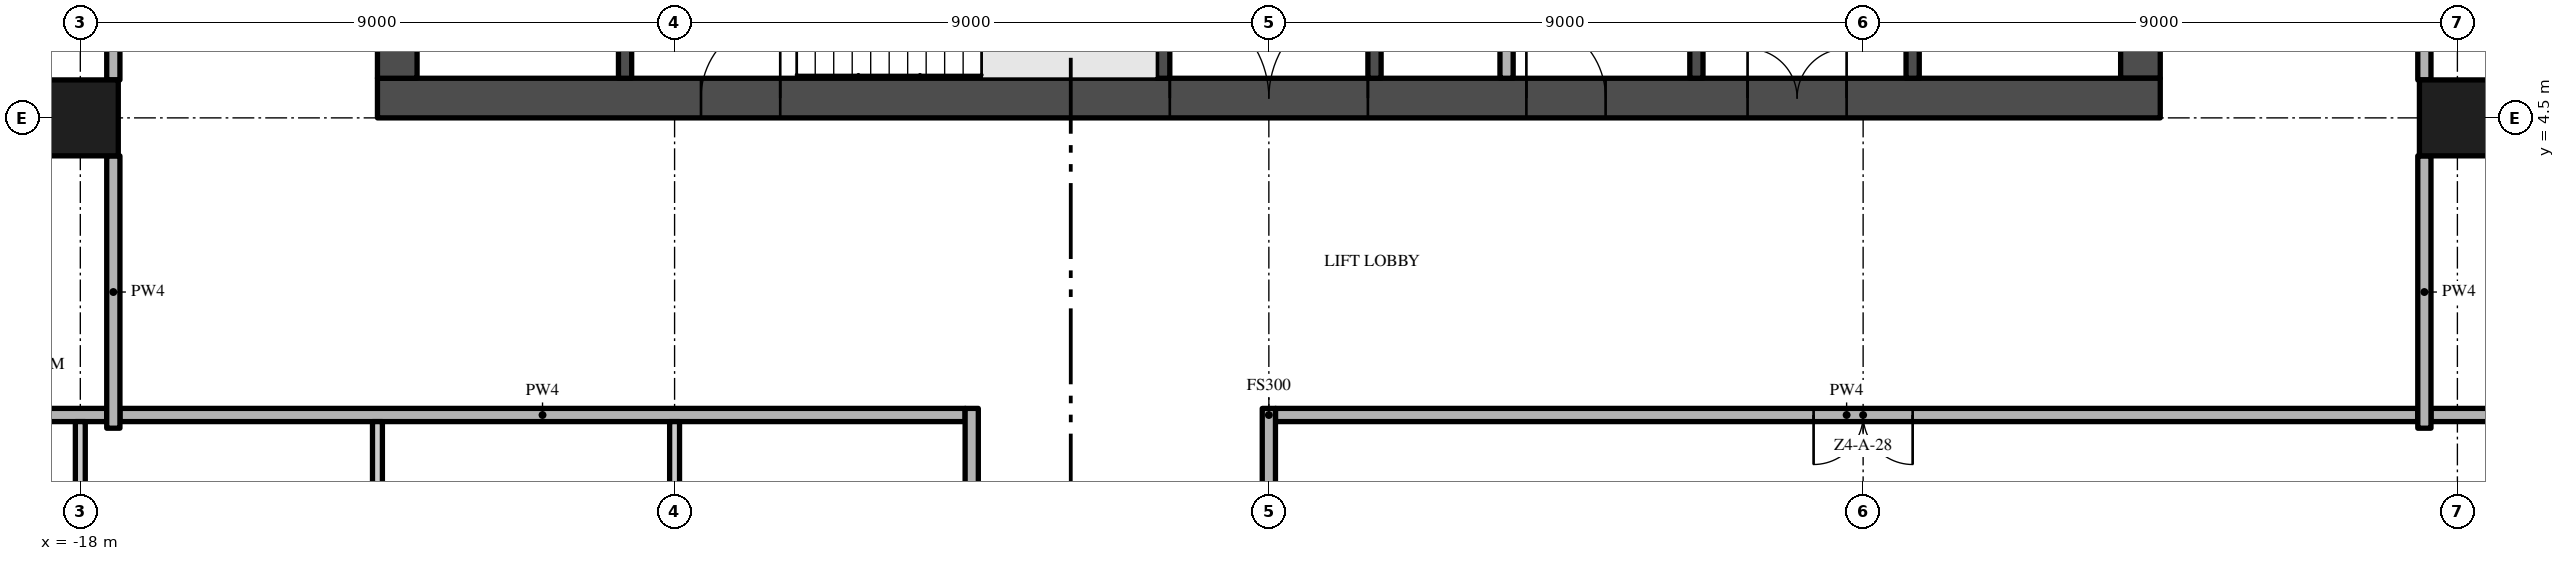
"""IFC4 building model, lengths in metres.
Left out: names, types, materials, properties, quantities, classifications, styles, units other than length and angle.
Written with IfcOpenShell. Run it as: python <this file> out.ifc"""

import sys

from ifc_helpers import new_model, si_unit, direction, frame, frame_2d, origin, origin_2d, place, context, subcontext, project, spatial, rectangle, extrude, element, fill, save


model = new_model("IFC4")
c1 = context("Model", 3, precision=1e-05, world=origin(), true_north=direction((0.0, 1.0)))
c2 = subcontext(c1, "Body", "Model", "MODEL_VIEW")
j1 = project(units=[si_unit("LENGTHUNIT", "METRE"), si_unit("PLANEANGLEUNIT", "RADIAN")], contexts=[c1])
p1 = place(None, origin())
s1 = spatial("IfcSite", under=j1, at=p1, CompositionType="ELEMENT")
p2 = place(p1, origin())
s2 = spatial("IfcBuilding", under=s1, at=p2, CompositionType="ELEMENT")
p3 = place(p2, frame((0.0, 0.0, 184.4)))
s3 = spatial("IfcBuildingStorey", under=s2, at=p3, CompositionType="ELEMENT", Elevation=184.4)
p4 = place(p3, frame((-13.5, 4.8, -0.3), z_axis=(0.0, 0.0, 1.0), x_axis=(1.0, 0.0, 0.0)))
e1 = element("IfcWall", 1, at=p4, inside=s3, PredefinedType="SHEAR", context=c2, shape_type="SweptSolid", body=[
    extrude(rectangle(XDim=27.0, YDim=0.6, at=frame_2d((13.5, 0.0))), origin(), (0.0, 0.0, 1.0), 3.8),
])
p5 = place(p4, frame((12.0, 0.0, 0.3)))
e2 = element("IfcOpeningElement", 2, at=p5, cuts=e1, PredefinedType="OPENING", context=c2, shape_type="SweptSolid", body=[
    extrude(rectangle(XDim=3.0, YDim=2.4, at=frame_2d((1.5, 1.2))), frame((0.0, 0.31, 0.0), z_axis=(0.0, -1.0, 0.0), x_axis=(1.0, 0.0, 0.0)), (0.0, 0.0, 1.0), 0.62),
])
p6 = place(p4, frame((4.9, 0.0, 0.3)))
e3 = element("IfcOpeningElement", 3, at=p6, cuts=e1, PredefinedType="OPENING", context=c2, shape_type="SweptSolid", body=[
    extrude(rectangle(XDim=1.2, YDim=2.2, at=frame_2d((0.6, 1.1))), frame((0.0, 0.31, 0.0), z_axis=(0.0, -1.0, 0.0), x_axis=(1.0, 0.0, 0.0)), (0.0, 0.0, 1.0), 0.62),
])
p7 = place(p4, frame((20.75, 0.0, 0.3)))
e4 = element("IfcOpeningElement", 4, at=p7, cuts=e1, PredefinedType="OPENING", context=c2, shape_type="SweptSolid", body=[
    extrude(rectangle(XDim=1.5, YDim=2.2, at=frame_2d((0.75, 1.1))), frame((0.0, 0.31, 0.0), z_axis=(0.0, -1.0, 0.0), x_axis=(1.0, 0.0, 0.0)), (0.0, 0.0, 1.0), 0.62),
])
p8 = place(p4, frame((17.4, 0.0, 0.3)))
e5 = element("IfcOpeningElement", 5, at=p8, cuts=e1, PredefinedType="OPENING", context=c2, shape_type="SweptSolid", body=[
    extrude(rectangle(XDim=1.2, YDim=2.2, at=frame_2d((0.6, 1.1))), frame((0.0, 0.31, 0.0), z_axis=(0.0, -1.0, 0.0), x_axis=(1.0, 0.0, 0.0)), (0.0, 0.0, 1.0), 0.62),
])
p9 = place(p3, frame((13.2, 5.1, -0.3), z_axis=(0.0, 0.0, 1.0), x_axis=(0.0, 1.0, 0.0)))
e6 = element("IfcWall", 6, at=p9, inside=s3, PredefinedType="SHEAR", context=c2, shape_type="SweptSolid", body=[
    extrude(rectangle(XDim=16.8, YDim=0.6, at=frame_2d((8.4, 0.0))), origin(), (0.0, 0.0, 1.0), 3.8),
])
p10 = place(p9, frame((6.3, 0.0, 0.3)))
e7 = element("IfcOpeningElement", 7, at=p10, cuts=e6, PredefinedType="OPENING", context=c2, shape_type="SweptSolid", body=[
    extrude(rectangle(XDim=1.2, YDim=2.2, at=frame_2d((0.6, 1.1))), frame((0.0, 0.31, 0.0), z_axis=(0.0, -1.0, 0.0), x_axis=(1.0, 0.0, 0.0)), (0.0, 0.0, 1.0), 0.62),
])
p11 = place(p3, frame((-13.2, 21.9, -0.3), z_axis=(0.0, 0.0, 1.0), x_axis=(0.0, -1.0, 0.0)))
e8 = element("IfcWall", 8, at=p11, inside=s3, PredefinedType="SHEAR", context=c2, shape_type="SweptSolid", body=[
    extrude(rectangle(XDim=16.8, YDim=0.6, at=frame_2d((8.4, 0.0))), origin(), (0.0, 0.0, 1.0), 3.8),
])
p12 = place(p11, frame((9.3, 0.0, 0.3)))
e9 = element("IfcOpeningElement", 9, at=p12, cuts=e8, PredefinedType="OPENING", context=c2, shape_type="SweptSolid", body=[
    extrude(rectangle(XDim=1.2, YDim=2.2, at=frame_2d((0.6, 1.1))), frame((0.0, 0.31, 0.0), z_axis=(0.0, -1.0, 0.0), x_axis=(1.0, 0.0, 0.0)), (0.0, 0.0, 1.0), 0.62),
])
for number, where, z_axis, x_axis in (
    (10, (-18.0, 4.5, 0.0), (0.0, 0.0, 1.0), (1.0, 0.0, 0.0)),
    (11, (18.0, 4.5, 0.0), (0.0, 0.0, 1.0), (1.0, 0.0, 0.0)),
):
    element("IfcColumn", number, at=place(p3, frame(where, z_axis=z_axis, x_axis=x_axis)), inside=s3, PredefinedType="COLUMN", context=c2, shape_type="SweptSolid", body=[
        extrude(rectangle(XDim=1.15, YDim=1.15, at=origin_2d()), origin(), (0.0, 0.0, 1.0), 3.5),
    ])
for number, where, z_axis, x_axis in (
    (12, (-9.75, 5.1, 0.0), (0.0, 0.0, 1.0), (0.0, 1.0, 0.0)),
    (13, (-1.6, 5.1, 0.0), (0.0, 0.0, 1.0), (0.0, 1.0, 0.0)),
):
    element("IfcWall", number, at=place(p3, frame(where, z_axis=z_axis, x_axis=x_axis)), inside=s3, PredefinedType="SHEAR", context=c2, shape_type="SweptSolid", body=[
        extrude(rectangle(XDim=2.85, YDim=0.2, at=frame_2d((1.425, 0.0))), origin(), (0.0, 0.0, 1.0), 3.5),
    ])
p13 = place(p3, frame((1.6, 13.5, 0.0), z_axis=(0.0, 0.0, 1.0), x_axis=(0.0, -1.0, 0.0)))
e14 = element("IfcWall", 14, at=p13, inside=s3, PredefinedType="SHEAR", context=c2, shape_type="SweptSolid", body=[
    extrude(rectangle(XDim=8.4, YDim=0.2, at=frame_2d((4.2, 0.0))), origin(), (0.0, 0.0, 1.0), 3.5),
])
p14 = place(p13, frame((3.35, 0.0, 0.0)))
e15 = element("IfcOpeningElement", 15, at=p14, cuts=e14, PredefinedType="OPENING", context=c2, shape_type="SweptSolid", body=[
    extrude(rectangle(XDim=0.9, YDim=2.1, at=frame_2d((0.45, 1.05))), frame((0.0, 0.11, 0.0), z_axis=(0.0, -1.0, 0.0), x_axis=(1.0, 0.0, 0.0)), (0.0, 0.0, 1.0), 0.22),
])
p15 = place(p3, frame((3.6, 13.5, 0.0), z_axis=(0.0, 0.0, 1.0), x_axis=(0.0, -1.0, 0.0)))
e16 = element("IfcWall", 16, at=p15, inside=s3, PredefinedType="PARTITIONING", context=c2, shape_type="SweptSolid", body=[
    extrude(rectangle(XDim=8.4, YDim=0.2, at=frame_2d((4.2, 0.0))), origin(), (0.0, 0.0, 1.0), 3.5),
])
p16 = place(p15, frame((3.75, 0.0, 0.0)))
e17 = element("IfcOpeningElement", 17, at=p16, cuts=e16, PredefinedType="OPENING", context=c2, shape_type="SweptSolid", body=[
    extrude(rectangle(XDim=0.9, YDim=2.1, at=frame_2d((0.45, 1.05))), frame((0.0, 0.11, 0.0), z_axis=(0.0, -1.0, 0.0), x_axis=(1.0, 0.0, 0.0)), (0.0, 0.0, 1.0), 0.22),
])
p17 = place(p3, frame((6.475, 5.1, 0.0), z_axis=(0.0, 0.0, 1.0), x_axis=(0.0, 1.0, 0.0)))
e18 = element("IfcWall", 18, at=p17, inside=s3, PredefinedType="SHEAR", context=c2, shape_type="SweptSolid", body=[
    extrude(rectangle(XDim=7.0, YDim=0.2, at=frame_2d((3.5, 0.0))), origin(), (0.0, 0.0, 1.0), 3.5),
])
p18 = place(p3, frame((9.75, 5.1, 0.0), z_axis=(0.0, 0.0, 1.0), x_axis=(0.0, 1.0, 0.0)))
e19 = element("IfcWall", 19, at=p18, inside=s3, PredefinedType="SHEAR", context=c2, shape_type="SweptSolid", body=[
    extrude(rectangle(XDim=2.5, YDim=0.2, at=frame_2d((1.25, 0.0))), origin(), (0.0, 0.0, 1.0), 3.5),
])
p19 = place(p18, frame((0.85, 0.0, 0.0)))
e20 = element("IfcOpeningElement", 20, at=p19, cuts=e19, PredefinedType="OPENING", context=c2, shape_type="SweptSolid", body=[
    extrude(rectangle(XDim=1.1, YDim=2.1, at=frame_2d((0.55, 1.05))), frame((0.0, 0.11, 0.0), z_axis=(0.0, -1.0, 0.0), x_axis=(1.0, 0.0, 0.0)), (0.0, 0.0, 1.0), 0.22),
])
p20 = place(p3, frame((-17.4, 0.0, 0.0), z_axis=(0.0, 0.0, 1.0), x_axis=(1.0, 0.0, 0.0)))
e21 = element("IfcWall", 21, at=p20, inside=s3, PredefinedType="PARTITIONING", context=c2, shape_type="SweptSolid", body=[
    extrude(rectangle(XDim=12.8, YDim=0.2, at=frame_2d((6.4, 0.0))), origin(), (0.0, 0.0, 1.0), 3.5),
])
p21 = place(p3, frame((17.4, 0.0, 0.0), z_axis=(0.0, 0.0, 1.0), x_axis=(-1.0, 0.0, 0.0)))
e22 = element("IfcWall", 22, at=p21, inside=s3, PredefinedType="PARTITIONING", context=c2, shape_type="SweptSolid", body=[
    extrude(rectangle(XDim=17.3, YDim=0.2, at=frame_2d((8.65, 0.0))), origin(), (0.0, 0.0, 1.0), 3.5),
])
p22 = place(p21, frame((7.65, 0.0, 0.0)))
e23 = element("IfcOpeningElement", 23, at=p22, cuts=e22, PredefinedType="OPENING", context=c2, shape_type="SweptSolid", body=[
    extrude(rectangle(XDim=1.5, YDim=2.4, at=frame_2d((0.75, 1.2))), frame((0.0, 0.11, 0.0), z_axis=(0.0, -1.0, 0.0), x_axis=(1.0, 0.0, 0.0)), (0.0, 0.0, 1.0), 0.22),
])
for number, where, z_axis, x_axis in (
    (24, (-26.7, 0.0, 0.0), (0.0, 0.0, 1.0), (1.0, 0.0, 0.0)),
    (25, (17.6, 0.0, 0.0), (0.0, 0.0, 1.0), (1.0, 0.0, 0.0)),
):
    element("IfcWall", number, at=place(p3, frame(where, z_axis=z_axis, x_axis=x_axis)), inside=s3, PredefinedType="PARTITIONING", context=c2, shape_type="SweptSolid", body=[
        extrude(rectangle(XDim=9.1, YDim=0.2, at=frame_2d((4.55, 0.0))), origin(), (0.0, 0.0, 1.0), 3.5),
    ])
p23 = place(p3, frame((-18.0, -3.925, 0.0), z_axis=(0.0, 0.0, 1.0), x_axis=(0.0, 1.0, 0.0)))
e26 = element("IfcWall", 26, at=p23, inside=s3, PredefinedType="PARTITIONING", context=c2, shape_type="SweptSolid", body=[
    extrude(rectangle(XDim=3.825, YDim=0.15, at=frame_2d((1.913, 0.0))), origin(), (0.0, 0.0, 1.0), 3.5),
])
p24 = place(p23, frame((0.15, 0.0, 0.0)))
e27 = element("IfcOpeningElement", 27, at=p24, cuts=e26, PredefinedType="OPENING", context=c2, shape_type="SweptSolid", body=[
    extrude(rectangle(XDim=1.0, YDim=2.4, at=frame_2d((0.5, 1.2))), frame((0.0, 0.085, 0.0), z_axis=(0.0, -1.0, 0.0), x_axis=(1.0, 0.0, 0.0)), (0.0, 0.0, 1.0), 0.17),
])
p25 = place(p3, frame((-17.5, -0.2, 0.0), z_axis=(0.0, 0.0, 1.0), x_axis=(0.0, 1.0, 0.0)))
e28 = element("IfcWall", 28, at=p25, inside=s3, PredefinedType="PARTITIONING", context=c2, shape_type="SweptSolid", body=[
    extrude(rectangle(XDim=4.125, YDim=0.2, at=frame_2d((2.062, 0.0))), origin(), (0.0, 0.0, 1.0), 3.5),
])
p26 = place(p3, frame((-17.5, 5.075, 0.0), z_axis=(0.0, 0.0, 1.0), x_axis=(0.0, 1.0, 0.0)))
e29 = element("IfcWall", 29, at=p26, inside=s3, PredefinedType="PARTITIONING", context=c2, shape_type="SweptSolid", body=[
    extrude(rectangle(XDim=7.85, YDim=0.2, at=frame_2d((3.925, 0.0))), origin(), (0.0, 0.0, 1.0), 3.5),
])
p27 = place(p26, frame((1.05, 0.0, 0.0)))
e30 = element("IfcOpeningElement", 30, at=p27, cuts=e29, PredefinedType="OPENING", context=c2, shape_type="SweptSolid", body=[
    extrude(rectangle(XDim=1.2, YDim=2.4, at=frame_2d((0.6, 1.2))), frame((0.0, 0.11, 0.0), z_axis=(0.0, -1.0, 0.0), x_axis=(1.0, 0.0, 0.0)), (0.0, 0.0, 1.0), 0.22),
])
p28 = place(p3, frame((-13.5, -11.325, 0.0), z_axis=(0.0, 0.0, 1.0), x_axis=(0.0, 1.0, 0.0)))
e31 = element("IfcWall", 31, at=p28, inside=s3, PredefinedType="PARTITIONING", context=c2, shape_type="SweptSolid", body=[
    extrude(rectangle(XDim=11.225, YDim=0.15, at=frame_2d((5.612, 0.0))), origin(), (0.0, 0.0, 1.0), 3.5),
])
p29 = place(p3, frame((-9.0, -3.925, 0.0), z_axis=(0.0, 0.0, 1.0), x_axis=(0.0, 1.0, 0.0)))
e32 = element("IfcWall", 32, at=p29, inside=s3, PredefinedType="PARTITIONING", context=c2, shape_type="SweptSolid", body=[
    extrude(rectangle(XDim=3.825, YDim=0.15, at=frame_2d((1.913, 0.0))), origin(), (0.0, 0.0, 1.0), 3.5),
])
p30 = place(p29, frame((2.025, 0.0, 0.0)))
e33 = element("IfcOpeningElement", 33, at=p30, cuts=e32, PredefinedType="OPENING", context=c2, shape_type="SweptSolid", body=[
    extrude(rectangle(XDim=0.8, YDim=2.0, at=frame_2d((0.4, 1.0))), frame((0.0, 0.085, 0.0), z_axis=(0.0, -1.0, 0.0), x_axis=(1.0, 0.0, 0.0)), (0.0, 0.0, 1.0), 0.17),
])
p31 = place(p3, frame((-4.5, -22.2, 0.0), z_axis=(0.0, 0.0, 1.0), x_axis=(0.0, 1.0, 0.0)))
e34 = element("IfcWall", 34, at=p31, inside=s3, PredefinedType="PARTITIONING", context=c2, shape_type="SweptSolid", body=[
    extrude(rectangle(XDim=22.3, YDim=0.2, at=frame_2d((11.15, 0.0))), origin(), (0.0, 0.0, 1.0), 3.5),
])
p32 = place(p31, frame((10.2, 0.0, 0.0)))
e35 = element("IfcOpeningElement", 35, at=p32, cuts=e34, PredefinedType="OPENING", context=c2, shape_type="SweptSolid", body=[
    extrude(rectangle(XDim=1.5, YDim=2.4, at=frame_2d((0.75, 1.2))), frame((0.0, 0.11, 0.0), z_axis=(0.0, -1.0, 0.0), x_axis=(1.0, 0.0, 0.0)), (0.0, 0.0, 1.0), 0.22),
])
p33 = place(p3, frame((0.0, -3.925, 0.0), z_axis=(0.0, 0.0, 1.0), x_axis=(0.0, 1.0, 0.0)))
e36 = element("IfcWall", 36, at=p33, inside=s3, PredefinedType="PARTITIONING", context=c2, shape_type="SweptSolid", body=[
    extrude(rectangle(XDim=4.025, YDim=0.2, at=frame_2d((2.013, 0.0))), origin(), (0.0, 0.0, 1.0), 3.5),
])
p34 = place(p3, frame((17.5, -0.2, 0.0), z_axis=(0.0, 0.0, 1.0), x_axis=(0.0, 1.0, 0.0)))
e37 = element("IfcWall", 37, at=p34, inside=s3, PredefinedType="PARTITIONING", context=c2, shape_type="SweptSolid", body=[
    extrude(rectangle(XDim=4.125, YDim=0.2, at=frame_2d((2.062, 0.0))), origin(), (0.0, 0.0, 1.0), 3.5),
])
p35 = place(p3, frame((17.5, 5.075, 0.0), z_axis=(0.0, 0.0, 1.0), x_axis=(0.0, 1.0, 0.0)))
e38 = element("IfcWall", 38, at=p35, inside=s3, PredefinedType="PARTITIONING", context=c2, shape_type="SweptSolid", body=[
    extrude(rectangle(XDim=7.85, YDim=0.2, at=frame_2d((3.925, 0.0))), origin(), (0.0, 0.0, 1.0), 3.5),
])
p36 = place(p5, frame((3.0, 0.0, 0.0), z_axis=(0.0, 0.0, 1.0), x_axis=(-1.0, 0.0, 0.0)))
e39 = element("IfcDoor", 39, at=p36, inside=s3, OperationType="DOUBLE_DOOR_SINGLE_SWING", PredefinedType="DOOR", context=c2, shape_type="SweptSolid", body=[
    extrude(rectangle(XDim=3.0, YDim=2.4, at=frame_2d((1.5, 1.2))), frame((0.0, 0.025, 0.0), z_axis=(0.0, -1.0, 0.0), x_axis=(1.0, 0.0, 0.0)), (0.0, 0.0, 1.0), 0.05),
])
fill(e2, e39)
p37 = place(p6, frame((1.2, 0.0, 0.0), z_axis=(0.0, 0.0, 1.0), x_axis=(-1.0, 0.0, 0.0)))
e40 = element("IfcDoor", 40, at=p37, inside=s3, OperationType="SINGLE_SWING_LEFT", PredefinedType="DOOR", context=c2, shape_type="SweptSolid", body=[
    extrude(rectangle(XDim=1.2, YDim=2.2, at=frame_2d((0.6, 1.1))), frame((0.0, 0.025, 0.0), z_axis=(0.0, -1.0, 0.0), x_axis=(1.0, 0.0, 0.0)), (0.0, 0.0, 1.0), 0.05),
])
fill(e3, e40)
p38 = place(p7, frame((1.5, 0.0, 0.0), z_axis=(0.0, 0.0, 1.0), x_axis=(-1.0, 0.0, 0.0)))
e41 = element("IfcDoor", 41, at=p38, inside=s3, OperationType="DOUBLE_DOOR_SINGLE_SWING", PredefinedType="DOOR", context=c2, shape_type="SweptSolid", body=[
    extrude(rectangle(XDim=1.5, YDim=2.2, at=frame_2d((0.75, 1.1))), frame((0.0, 0.025, 0.0), z_axis=(0.0, -1.0, 0.0), x_axis=(1.0, 0.0, 0.0)), (0.0, 0.0, 1.0), 0.05),
])
fill(e4, e41)
p39 = place(p8, frame((1.2, 0.0, 0.0), z_axis=(0.0, 0.0, 1.0), x_axis=(-1.0, 0.0, 0.0)))
e42 = element("IfcDoor", 42, at=p39, inside=s3, OperationType="SINGLE_SWING_RIGHT", PredefinedType="DOOR", context=c2, shape_type="SweptSolid", body=[
    extrude(rectangle(XDim=1.2, YDim=2.2, at=frame_2d((0.6, 1.1))), frame((0.0, 0.025, 0.0), z_axis=(0.0, -1.0, 0.0), x_axis=(1.0, 0.0, 0.0)), (0.0, 0.0, 1.0), 0.05),
])
fill(e5, e42)
p40 = place(p22, origin())
e43 = element("IfcDoor", 43, at=p40, inside=s3, OperationType="DOUBLE_DOOR_SINGLE_SWING", PredefinedType="DOOR", context=c2, shape_type="SweptSolid", body=[
    extrude(rectangle(XDim=1.5, YDim=2.4, at=frame_2d((0.75, 1.2))), frame((0.0, 0.025, 0.0), z_axis=(0.0, -1.0, 0.0), x_axis=(1.0, 0.0, 0.0)), (0.0, 0.0, 1.0), 0.05),
])
fill(e23, e43)
save(model, sys.argv[1])
